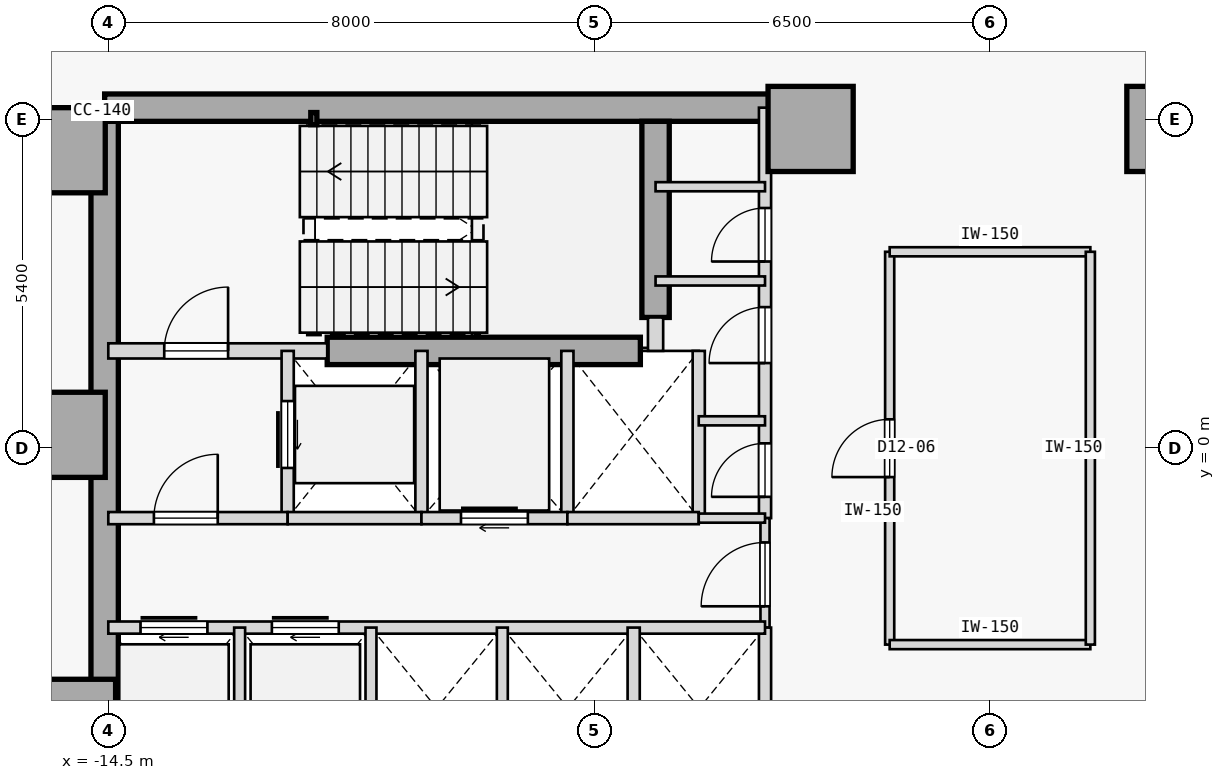
"""IFC4 building model, lengths in metres.
Left out: names, types, materials, properties, quantities, classifications, styles, units other than length and angle.
Written with IfcOpenShell. Run it as: python <this file> out.ifc"""

import sys

from ifc_helpers import new_model, si_unit, direction, frame, frame_2d, origin, origin_2d, place, context, subcontext, project, spatial, rectangle, hollow_rectangle, extrude, element, fill, save


model = new_model("IFC4")
c1 = context("Model", 3, precision=1e-05, world=origin(), true_north=direction((0.0, 1.0)))
c2 = subcontext(c1, "Body", "Model", "MODEL_VIEW")
j1 = project(units=[si_unit("LENGTHUNIT", "METRE"), si_unit("PLANEANGLEUNIT", "RADIAN")], contexts=[c1])
p1 = place(None, origin())
s1 = spatial("IfcSite", under=j1, at=p1, CompositionType="ELEMENT")
p2 = place(p1, origin())
s2 = spatial("IfcBuilding", under=s1, at=p2, CompositionType="ELEMENT")
p3 = place(p2, frame((0.0, 0.0, 52.2)))
s3 = spatial("IfcBuildingStorey", under=s2, at=p3, CompositionType="ELEMENT", Elevation=52.2)
for number, where, z_axis, x_axis in (
    (1, (-15.25, 4.9, 0.0), (0.0, 0.0, 1.0), (1.0, 0.0, 0.0)),
    (2, (-15.25, 0.22, 0.0), (0.0, 0.0, 1.0), (1.0, 0.0, 0.0)),
    (3, (-15.08, -4.5, 0.0), (0.0, 0.0, 1.0), (1.0, 0.0, 0.0)),
    (4, (-2.95, 5.25, 0.0), (0.0, 0.0, 1.0), (1.0, 0.0, 0.0)),
    (5, (2.95, 5.25, 0.0), (0.0, 0.0, 1.0), (1.0, 0.0, 0.0)),
):
    element("IfcColumn", number, at=place(p3, frame(where, z_axis=z_axis, x_axis=x_axis)), inside=s3, PredefinedType="COLUMN", context=c2, shape_type="SweptSolid", body=[
        extrude(rectangle(XDim=1.4, YDim=1.4, at=origin_2d()), origin(), (0.0, 0.0, 1.0), 3.8),
    ])
p4 = place(p3, frame((-14.56, 5.6, 0.0), z_axis=(0.0, 0.0, 1.0), x_axis=(1.0, 0.0, 0.0)))
e6 = element("IfcWall", 6, at=p4, inside=s3, PredefinedType="SHEAR", context=c2, shape_type="SweptSolid", body=[
    extrude(rectangle(XDim=11.41, YDim=0.45, at=frame_2d((5.705, 0.0))), origin(), (0.0, 0.0, 1.0), 3.575),
])
p5 = place(p3, frame((-14.56, -5.375, 0.0), z_axis=(0.0, 0.0, 1.0), x_axis=(0.0, 1.0, 0.0)))
e7 = element("IfcWall", 7, at=p5, inside=s3, PredefinedType="SHEAR", context=c2, shape_type="SweptSolid", body=[
    extrude(rectangle(XDim=10.75, YDim=0.45, at=frame_2d((5.375, 0.0))), origin(), (0.0, 0.0, 1.0), 3.575),
])
p6 = place(p3, frame((-5.5, 2.15, 0.0), z_axis=(0.0, 0.0, 1.0), x_axis=(0.0, 1.0, 0.0)))
e8 = element("IfcWall", 8, at=p6, inside=s3, PredefinedType="SHEAR", context=c2, shape_type="SweptSolid", body=[
    extrude(rectangle(XDim=3.225, YDim=0.45, at=frame_2d((1.613, 0.0))), origin(), (0.0, 0.0, 1.0), 3.575),
])
p7 = place(p3, frame((-10.9, 1.6, 0.0), z_axis=(0.0, 0.0, 1.0), x_axis=(1.0, 0.0, 0.0)))
e9 = element("IfcWall", 9, at=p7, inside=s3, PredefinedType="SHEAR", context=c2, shape_type="SweptSolid", body=[
    extrude(rectangle(XDim=5.15, YDim=0.45, at=frame_2d((2.575, 0.0))), origin(), (0.0, 0.0, 1.0), 3.575),
])
p8 = place(p3, frame((-11.12, 5.42, 0.0), z_axis=(0.0, 0.0, 1.0), x_axis=(1.0, 0.0, 0.0)))
e10 = element("IfcColumn", 10, at=p8, inside=s3, PredefinedType="COLUMN", context=c2, shape_type="SweptSolid", body=[
    extrude(hollow_rectangle(XDim=0.1, YDim=0.2, WallThickness=0.008, at=origin_2d()), origin(), (0.0, 0.0, 1.0), 3.8),
])
p9 = place(p3, frame((-14.5, 1.6, 0.0), z_axis=(0.0, 0.0, 1.0), x_axis=(1.0, 0.0, 0.0)))
e11 = element("IfcWall", 11, at=p9, inside=s3, PredefinedType="STANDARD", context=c2, shape_type="SweptSolid", body=[
    extrude(rectangle(XDim=3.6, YDim=0.25, at=frame_2d((1.8, 0.0))), origin(), (0.0, 0.0, 1.0), 3.575),
])
p10 = place(p9, frame((0.92, 0.0, 0.0)))
e12 = element("IfcOpeningElement", 12, at=p10, cuts=e11, PredefinedType="OPENING", context=c2, shape_type="SweptSolid", body=[
    extrude(rectangle(XDim=1.05, YDim=2.15, at=frame_2d((0.525, 1.075))), frame((0.0, 0.135, 0.0), z_axis=(0.0, -1.0, 0.0), x_axis=(1.0, 0.0, 0.0)), (0.0, 0.0, 1.0), 0.27),
])
p11 = place(p3, frame((-5.5, 1.6, 0.0), z_axis=(0.0, 0.0, 1.0), x_axis=(0.0, 1.0, 0.0)))
e13 = element("IfcWall", 13, at=p11, inside=s3, PredefinedType="STANDARD", context=c2, shape_type="SweptSolid", body=[
    extrude(rectangle(XDim=0.55, YDim=0.25, at=frame_2d((0.275, 0.0))), origin(), (0.0, 0.0, 1.0), 3.575),
])
p12 = place(p3, frame((-3.7, -1.15, 0.0), z_axis=(0.0, 0.0, 1.0), x_axis=(0.0, 1.0, 0.0)))
e14 = element("IfcWall", 14, at=p12, inside=s3, PredefinedType="STANDARD", context=c2, shape_type="SweptSolid", body=[
    extrude(rectangle(XDim=6.75, YDim=0.2, at=frame_2d((3.375, 0.0))), origin(), (0.0, 0.0, 1.0), 3.575),
])
p13 = place(p12, frame((0.35, 0.0, 0.0)))
e15 = element("IfcOpeningElement", 15, at=p13, cuts=e14, PredefinedType="OPENING", context=c2, shape_type="SweptSolid", body=[
    extrude(rectangle(XDim=0.88, YDim=2.15, at=frame_2d((0.44, 1.075))), frame((0.0, 0.11, 0.0), z_axis=(0.0, -1.0, 0.0), x_axis=(1.0, 0.0, 0.0)), (0.0, 0.0, 1.0), 0.22),
])
p14 = place(p12, frame((2.55, 0.0, 0.0)))
e16 = element("IfcOpeningElement", 16, at=p14, cuts=e14, PredefinedType="OPENING", context=c2, shape_type="SweptSolid", body=[
    extrude(rectangle(XDim=0.92, YDim=2.15, at=frame_2d((0.46, 1.075))), frame((0.0, 0.11, 0.0), z_axis=(0.0, -1.0, 0.0), x_axis=(1.0, 0.0, 0.0)), (0.0, 0.0, 1.0), 0.22),
])
p15 = place(p12, frame((4.22, 0.0, 0.0)))
e17 = element("IfcOpeningElement", 17, at=p15, cuts=e14, PredefinedType="OPENING", context=c2, shape_type="SweptSolid", body=[
    extrude(rectangle(XDim=0.88, YDim=2.15, at=frame_2d((0.44, 1.075))), frame((0.0, 0.11, 0.0), z_axis=(0.0, -1.0, 0.0), x_axis=(1.0, 0.0, 0.0)), (0.0, 0.0, 1.0), 0.22),
])
p16 = place(p3, frame((-3.7, -2.95, 0.0), z_axis=(0.0, 0.0, 1.0), x_axis=(0.0, 1.0, 0.0)))
e18 = element("IfcWall", 18, at=p16, inside=s3, PredefinedType="PARTITIONING", context=c2, shape_type="SweptSolid", body=[
    extrude(rectangle(XDim=1.8, YDim=0.15, at=frame_2d((0.9, 0.0))), origin(), (0.0, 0.0, 1.0), 3.575),
])
p17 = place(p16, frame((0.35, 0.0, 0.0)))
e19 = element("IfcOpeningElement", 19, at=p17, cuts=e18, PredefinedType="OPENING", context=c2, shape_type="SweptSolid", body=[
    extrude(rectangle(XDim=1.05, YDim=2.18, at=frame_2d((0.525, 1.09))), frame((0.0, 0.085, 0.0), z_axis=(0.0, -1.0, 0.0), x_axis=(1.0, 0.0, 0.0)), (0.0, 0.0, 1.0), 0.17),
])
p18 = place(p3, frame((-3.7, -5.6, 0.0), z_axis=(0.0, 0.0, 1.0), x_axis=(0.0, 1.0, 0.0)))
e20 = element("IfcWall", 20, at=p18, inside=s3, PredefinedType="STANDARD", context=c2, shape_type="SweptSolid", body=[
    extrude(rectangle(XDim=2.65, YDim=0.2, at=frame_2d((1.325, 0.0))), origin(), (0.0, 0.0, 1.0), 3.575),
])
p19 = place(p3, frame((-11.55, -1.15, 0.0), z_axis=(0.0, 0.0, 1.0), x_axis=(0.0, 1.0, 0.0)))
e21 = element("IfcWall", 21, at=p19, inside=s3, PredefinedType="STANDARD", context=c2, shape_type="SweptSolid", body=[
    extrude(rectangle(XDim=2.75, YDim=0.2, at=frame_2d((1.375, 0.0))), origin(), (0.0, 0.0, 1.0), 3.575),
])
p20 = place(p19, frame((0.825, 0.0, 0.0)))
e22 = element("IfcOpeningElement", 22, at=p20, cuts=e21, PredefinedType="OPENING", context=c2, shape_type="SweptSolid", body=[
    extrude(rectangle(XDim=1.1, YDim=2.15, at=frame_2d((0.55, 1.075))), frame((0.0, 0.11, 0.0), z_axis=(0.0, -1.0, 0.0), x_axis=(1.0, 0.0, 0.0)), (0.0, 0.0, 1.0), 0.22),
])
p21 = place(p3, frame((-9.35, -1.15, 0.0), z_axis=(0.0, 0.0, 1.0), x_axis=(0.0, 1.0, 0.0)))
e23 = element("IfcWall", 23, at=p21, inside=s3, PredefinedType="STANDARD", context=c2, shape_type="SweptSolid", body=[
    extrude(rectangle(XDim=2.75, YDim=0.2, at=frame_2d((1.375, 0.0))), origin(), (0.0, 0.0, 1.0), 3.575),
])
p22 = place(p3, frame((-14.5, -1.15, 0.0), z_axis=(0.0, 0.0, 1.0), x_axis=(1.0, 0.0, 0.0)))
e24 = element("IfcWall", 24, at=p22, inside=s3, PredefinedType="STANDARD", context=c2, shape_type="SweptSolid", body=[
    extrude(rectangle(XDim=2.95, YDim=0.2, at=frame_2d((1.475, 0.0))), origin(), (0.0, 0.0, 1.0), 3.575),
])
p23 = place(p22, frame((0.75, 0.0, 0.0)))
e25 = element("IfcOpeningElement", 25, at=p23, cuts=e24, PredefinedType="OPENING", context=c2, shape_type="SweptSolid", body=[
    extrude(rectangle(XDim=1.05, YDim=2.18, at=frame_2d((0.525, 1.09))), frame((0.0, 0.11, 0.0), z_axis=(0.0, -1.0, 0.0), x_axis=(1.0, 0.0, 0.0)), (0.0, 0.0, 1.0), 0.22),
])
p24 = place(p3, frame((-11.55, -1.15, 0.0), z_axis=(0.0, 0.0, 1.0), x_axis=(1.0, 0.0, 0.0)))
e26 = element("IfcWall", 26, at=p24, inside=s3, PredefinedType="STANDARD", context=c2, shape_type="SweptSolid", body=[
    extrude(rectangle(XDim=2.2, YDim=0.2, at=frame_2d((1.1, 0.0))), origin(), (0.0, 0.0, 1.0), 3.575),
])
p25 = place(p3, frame((-6.95, -1.15, 0.0), z_axis=(0.0, 0.0, 1.0), x_axis=(0.0, 1.0, 0.0)))
e27 = element("IfcWall", 27, at=p25, inside=s3, PredefinedType="STANDARD", context=c2, shape_type="SweptSolid", body=[
    extrude(rectangle(XDim=2.75, YDim=0.2, at=frame_2d((1.375, 0.0))), origin(), (0.0, 0.0, 1.0), 3.575),
])
p26 = place(p3, frame((-9.35, -1.15, 0.0), z_axis=(0.0, 0.0, 1.0), x_axis=(1.0, 0.0, 0.0)))
e28 = element("IfcWall", 28, at=p26, inside=s3, PredefinedType="STANDARD", context=c2, shape_type="SweptSolid", body=[
    extrude(rectangle(XDim=2.4, YDim=0.2, at=frame_2d((1.2, 0.0))), origin(), (0.0, 0.0, 1.0), 3.575),
])
p27 = place(p26, frame((0.65, 0.0, 0.0)))
e29 = element("IfcOpeningElement", 29, at=p27, cuts=e28, PredefinedType="OPENING", context=c2, shape_type="SweptSolid", body=[
    extrude(rectangle(XDim=1.1, YDim=2.15, at=frame_2d((0.55, 1.075))), frame((0.0, 0.11, 0.0), z_axis=(0.0, -1.0, 0.0), x_axis=(1.0, 0.0, 0.0)), (0.0, 0.0, 1.0), 0.22),
])
p28 = place(p3, frame((-4.79, -1.15, 0.0), z_axis=(0.0, 0.0, 1.0), x_axis=(0.0, 1.0, 0.0)))
e30 = element("IfcWall", 30, at=p28, inside=s3, PredefinedType="STANDARD", context=c2, shape_type="SweptSolid", body=[
    extrude(rectangle(XDim=2.75, YDim=0.2, at=frame_2d((1.375, 0.0))), origin(), (0.0, 0.0, 1.0), 3.575),
])
p29 = place(p3, frame((-6.95, -1.15, 0.0), z_axis=(0.0, 0.0, 1.0), x_axis=(1.0, 0.0, 0.0)))
e31 = element("IfcWall", 31, at=p29, inside=s3, PredefinedType="STANDARD", context=c2, shape_type="SweptSolid", body=[
    extrude(rectangle(XDim=2.16, YDim=0.2, at=frame_2d((1.08, 0.0))), origin(), (0.0, 0.0, 1.0), 3.575),
])
p30 = place(p3, frame((-4.79, -1.15, 0.0), z_axis=(0.0, 0.0, 1.0), x_axis=(1.0, 0.0, 0.0)))
e32 = element("IfcWall", 32, at=p30, inside=s3, PredefinedType="PARTITIONING", context=c2, shape_type="SweptSolid", body=[
    extrude(rectangle(XDim=1.09, YDim=0.15, at=frame_2d((0.545, 0.0))), origin(), (0.0, 0.0, 1.0), 3.575),
])
p31 = place(p3, frame((-14.5, -2.95, 0.0), z_axis=(0.0, 0.0, 1.0), x_axis=(1.0, 0.0, 0.0)))
e33 = element("IfcWall", 33, at=p31, inside=s3, PredefinedType="STANDARD", context=c2, shape_type="SweptSolid", body=[
    extrude(rectangle(XDim=10.8, YDim=0.2, at=frame_2d((5.4, 0.0))), origin(), (0.0, 0.0, 1.0), 3.575),
])
p32 = place(p31, frame((0.53, 0.0, 0.0)))
e34 = element("IfcOpeningElement", 34, at=p32, cuts=e33, PredefinedType="OPENING", context=c2, shape_type="SweptSolid", body=[
    extrude(rectangle(XDim=1.1, YDim=2.15, at=frame_2d((0.55, 1.075))), frame((0.0, 0.11, 0.0), z_axis=(0.0, -1.0, 0.0), x_axis=(1.0, 0.0, 0.0)), (0.0, 0.0, 1.0), 0.22),
])
p33 = place(p31, frame((2.69, 0.0, 0.0)))
e35 = element("IfcOpeningElement", 35, at=p33, cuts=e33, PredefinedType="OPENING", context=c2, shape_type="SweptSolid", body=[
    extrude(rectangle(XDim=1.1, YDim=2.15, at=frame_2d((0.55, 1.075))), frame((0.0, 0.11, 0.0), z_axis=(0.0, -1.0, 0.0), x_axis=(1.0, 0.0, 0.0)), (0.0, 0.0, 1.0), 0.22),
])
p34 = place(p3, frame((-5.86, -5.6, 0.0), z_axis=(0.0, 0.0, 1.0), x_axis=(0.0, 1.0, 0.0)))
e36 = element("IfcWall", 36, at=p34, inside=s3, PredefinedType="STANDARD", context=c2, shape_type="SweptSolid", body=[
    extrude(rectangle(XDim=2.65, YDim=0.2, at=frame_2d((1.325, 0.0))), origin(), (0.0, 0.0, 1.0), 3.575),
])
for number, where, z_axis, x_axis in (
    (37, (-12.34, -5.6, 0.0), (0.0, 0.0, 1.0), (0.0, 1.0, 0.0)),
    (38, (-10.18, -5.6, 0.0), (0.0, 0.0, 1.0), (0.0, 1.0, 0.0)),
    (39, (-8.02, -5.6, 0.0), (0.0, 0.0, 1.0), (0.0, 1.0, 0.0)),
):
    element("IfcWall", number, at=place(p3, frame(where, z_axis=z_axis, x_axis=x_axis)), inside=s3, PredefinedType="STANDARD", context=c2, shape_type="SweptSolid", body=[
        extrude(rectangle(XDim=2.65, YDim=0.18, at=frame_2d((1.325, 0.0))), origin(), (0.0, 0.0, 1.0), 3.575),
    ])
p35 = place(p3, frame((-5.5, 4.3, 0.0), z_axis=(0.0, 0.0, 1.0), x_axis=(1.0, 0.0, 0.0)))
e40 = element("IfcWall", 40, at=p35, inside=s3, PredefinedType="PARTITIONING", context=c2, shape_type="SweptSolid", body=[
    extrude(rectangle(XDim=1.8, YDim=0.15, at=frame_2d((0.9, 0.0))), origin(), (0.0, 0.0, 1.0), 3.575),
])
p36 = place(p3, frame((-4.79, 0.45, 0.0), z_axis=(0.0, 0.0, 1.0), x_axis=(1.0, 0.0, 0.0)))
e41 = element("IfcWall", 41, at=p36, inside=s3, PredefinedType="PARTITIONING", context=c2, shape_type="SweptSolid", body=[
    extrude(rectangle(XDim=1.09, YDim=0.15, at=frame_2d((0.545, 0.0))), origin(), (0.0, 0.0, 1.0), 3.575),
])
p37 = place(p3, frame((-5.5, 2.75, 0.0), z_axis=(0.0, 0.0, 1.0), x_axis=(1.0, 0.0, 0.0)))
e42 = element("IfcWall", 42, at=p37, inside=s3, PredefinedType="PARTITIONING", context=c2, shape_type="SweptSolid", body=[
    extrude(rectangle(XDim=1.8, YDim=0.15, at=frame_2d((0.9, 0.0))), origin(), (0.0, 0.0, 1.0), 3.575),
])
p38 = place(p3, frame((-1.65, -3.23, 0.0), z_axis=(0.0, 0.0, 1.0), x_axis=(0.0, 1.0, 0.0)))
e43 = element("IfcWall", 43, at=p38, inside=s3, PredefinedType="PARTITIONING", context=c2, shape_type="SweptSolid", body=[
    extrude(rectangle(XDim=6.46, YDim=0.15, at=frame_2d((3.23, 0.0))), origin(), (0.0, 0.0, 1.0), 3.575),
])
p39 = place(p38, frame((2.755, 0.0, 0.0)))
e44 = element("IfcOpeningElement", 44, at=p39, cuts=e43, PredefinedType="OPENING", context=c2, shape_type="SweptSolid", body=[
    extrude(rectangle(XDim=0.95, YDim=2.15, at=frame_2d((0.475, 1.075))), frame((0.0, 0.085, 0.0), z_axis=(0.0, -1.0, 0.0), x_axis=(1.0, 0.0, 0.0)), (0.0, 0.0, 1.0), 0.17),
])
for number, where, z_axis, x_axis in (
    (45, (-1.65, -3.23, 0.0), (0.0, 0.0, 1.0), (1.0, 0.0, 0.0)),
    (46, (-1.65, 3.23, 0.0), (0.0, 0.0, 1.0), (1.0, 0.0, 0.0)),
):
    element("IfcWall", number, at=place(p3, frame(where, z_axis=z_axis, x_axis=x_axis)), inside=s3, PredefinedType="PARTITIONING", context=c2, shape_type="SweptSolid", body=[
        extrude(rectangle(XDim=3.3, YDim=0.15, at=frame_2d((1.65, 0.0))), origin(), (0.0, 0.0, 1.0), 3.575),
    ])
p40 = place(p3, frame((1.65, -3.23, 0.0), z_axis=(0.0, 0.0, 1.0), x_axis=(0.0, 1.0, 0.0)))
e47 = element("IfcWall", 47, at=p40, inside=s3, PredefinedType="PARTITIONING", context=c2, shape_type="SweptSolid", body=[
    extrude(rectangle(XDim=6.46, YDim=0.15, at=frame_2d((3.23, 0.0))), origin(), (0.0, 0.0, 1.0), 3.575),
])
p41 = place(p10, origin())
e48 = element("IfcDoor", 48, at=p41, inside=s3, OperationType="SINGLE_SWING_RIGHT", PredefinedType="DOOR", context=c2, shape_type="SweptSolid", body=[
    extrude(rectangle(XDim=1.05, YDim=2.15, at=frame_2d((0.525, 1.075))), frame((0.0, 0.025, 0.0), z_axis=(0.0, -1.0, 0.0), x_axis=(1.0, 0.0, 0.0)), (0.0, 0.0, 1.0), 0.05),
])
fill(e12, e48)
p42 = place(p23, origin())
e49 = element("IfcDoor", 49, at=p42, inside=s3, OperationType="SINGLE_SWING_RIGHT", PredefinedType="DOOR", context=c2, shape_type="SweptSolid", body=[
    extrude(rectangle(XDim=1.05, YDim=2.18, at=frame_2d((0.525, 1.09))), frame((0.0, 0.025, 0.0), z_axis=(0.0, -1.0, 0.0), x_axis=(1.0, 0.0, 0.0)), (0.0, 0.0, 1.0), 0.05),
])
fill(e25, e49)
p43 = place(p17, origin())
e50 = element("IfcDoor", 50, at=p43, inside=s3, OperationType="SINGLE_SWING_LEFT", PredefinedType="DOOR", context=c2, shape_type="SweptSolid", body=[
    extrude(rectangle(XDim=1.05, YDim=2.18, at=frame_2d((0.525, 1.09))), frame((0.0, 0.025, 0.0), z_axis=(0.0, -1.0, 0.0), x_axis=(1.0, 0.0, 0.0)), (0.0, 0.0, 1.0), 0.05),
])
fill(e19, e50)
p44 = place(p20, origin())
e51 = element("IfcDoor", 51, at=p44, inside=s3, OperationType="SLIDING_TO_RIGHT", PredefinedType="DOOR", context=c2, shape_type="SweptSolid", body=[
    extrude(rectangle(XDim=1.1, YDim=2.15, at=frame_2d((0.55, 1.075))), frame((0.0, 0.025, 0.0), z_axis=(0.0, -1.0, 0.0), x_axis=(1.0, 0.0, 0.0)), (0.0, 0.0, 1.0), 0.05),
])
fill(e22, e51)
p45 = place(p27, origin())
e52 = element("IfcDoor", 52, at=p45, inside=s3, OperationType="SLIDING_TO_RIGHT", PredefinedType="DOOR", context=c2, shape_type="SweptSolid", body=[
    extrude(rectangle(XDim=1.1, YDim=2.15, at=frame_2d((0.55, 1.075))), frame((0.0, 0.025, 0.0), z_axis=(0.0, -1.0, 0.0), x_axis=(1.0, 0.0, 0.0)), (0.0, 0.0, 1.0), 0.05),
])
fill(e29, e52)
p46 = place(p32, origin())
e53 = element("IfcDoor", 53, at=p46, inside=s3, OperationType="SLIDING_TO_RIGHT", PredefinedType="DOOR", context=c2, shape_type="SweptSolid", body=[
    extrude(rectangle(XDim=1.1, YDim=2.15, at=frame_2d((0.55, 1.075))), frame((0.0, 0.025, 0.0), z_axis=(0.0, -1.0, 0.0), x_axis=(1.0, 0.0, 0.0)), (0.0, 0.0, 1.0), 0.05),
])
fill(e34, e53)
p47 = place(p33, origin())
e54 = element("IfcDoor", 54, at=p47, inside=s3, OperationType="SLIDING_TO_RIGHT", PredefinedType="DOOR", context=c2, shape_type="SweptSolid", body=[
    extrude(rectangle(XDim=1.1, YDim=2.15, at=frame_2d((0.55, 1.075))), frame((0.0, 0.025, 0.0), z_axis=(0.0, -1.0, 0.0), x_axis=(1.0, 0.0, 0.0)), (0.0, 0.0, 1.0), 0.05),
])
fill(e35, e54)
p48 = place(p13, origin())
e55 = element("IfcDoor", 55, at=p48, inside=s3, OperationType="SINGLE_SWING_LEFT", PredefinedType="DOOR", context=c2, shape_type="SweptSolid", body=[
    extrude(rectangle(XDim=0.88, YDim=2.15, at=frame_2d((0.44, 1.075))), frame((0.0, 0.025, 0.0), z_axis=(0.0, -1.0, 0.0), x_axis=(1.0, 0.0, 0.0)), (0.0, 0.0, 1.0), 0.05),
])
fill(e15, e55)
p49 = place(p14, origin())
e56 = element("IfcDoor", 56, at=p49, inside=s3, OperationType="SINGLE_SWING_LEFT", PredefinedType="DOOR", context=c2, shape_type="SweptSolid", body=[
    extrude(rectangle(XDim=0.92, YDim=2.15, at=frame_2d((0.46, 1.075))), frame((0.0, 0.025, 0.0), z_axis=(0.0, -1.0, 0.0), x_axis=(1.0, 0.0, 0.0)), (0.0, 0.0, 1.0), 0.05),
])
fill(e16, e56)
p50 = place(p15, origin())
e57 = element("IfcDoor", 57, at=p50, inside=s3, OperationType="SINGLE_SWING_LEFT", PredefinedType="DOOR", context=c2, shape_type="SweptSolid", body=[
    extrude(rectangle(XDim=0.88, YDim=2.15, at=frame_2d((0.44, 1.075))), frame((0.0, 0.025, 0.0), z_axis=(0.0, -1.0, 0.0), x_axis=(1.0, 0.0, 0.0)), (0.0, 0.0, 1.0), 0.05),
])
fill(e17, e57)
p51 = place(p39, origin())
e58 = element("IfcDoor", 58, at=p51, inside=s3, OperationType="SINGLE_SWING_LEFT", PredefinedType="DOOR", context=c2, shape_type="SweptSolid", body=[
    extrude(rectangle(XDim=0.95, YDim=2.15, at=frame_2d((0.475, 1.075))), frame((0.0, 0.025, 0.0), z_axis=(0.0, -1.0, 0.0), x_axis=(1.0, 0.0, 0.0)), (0.0, 0.0, 1.0), 0.05),
])
fill(e44, e58)
save(model, sys.argv[1])
